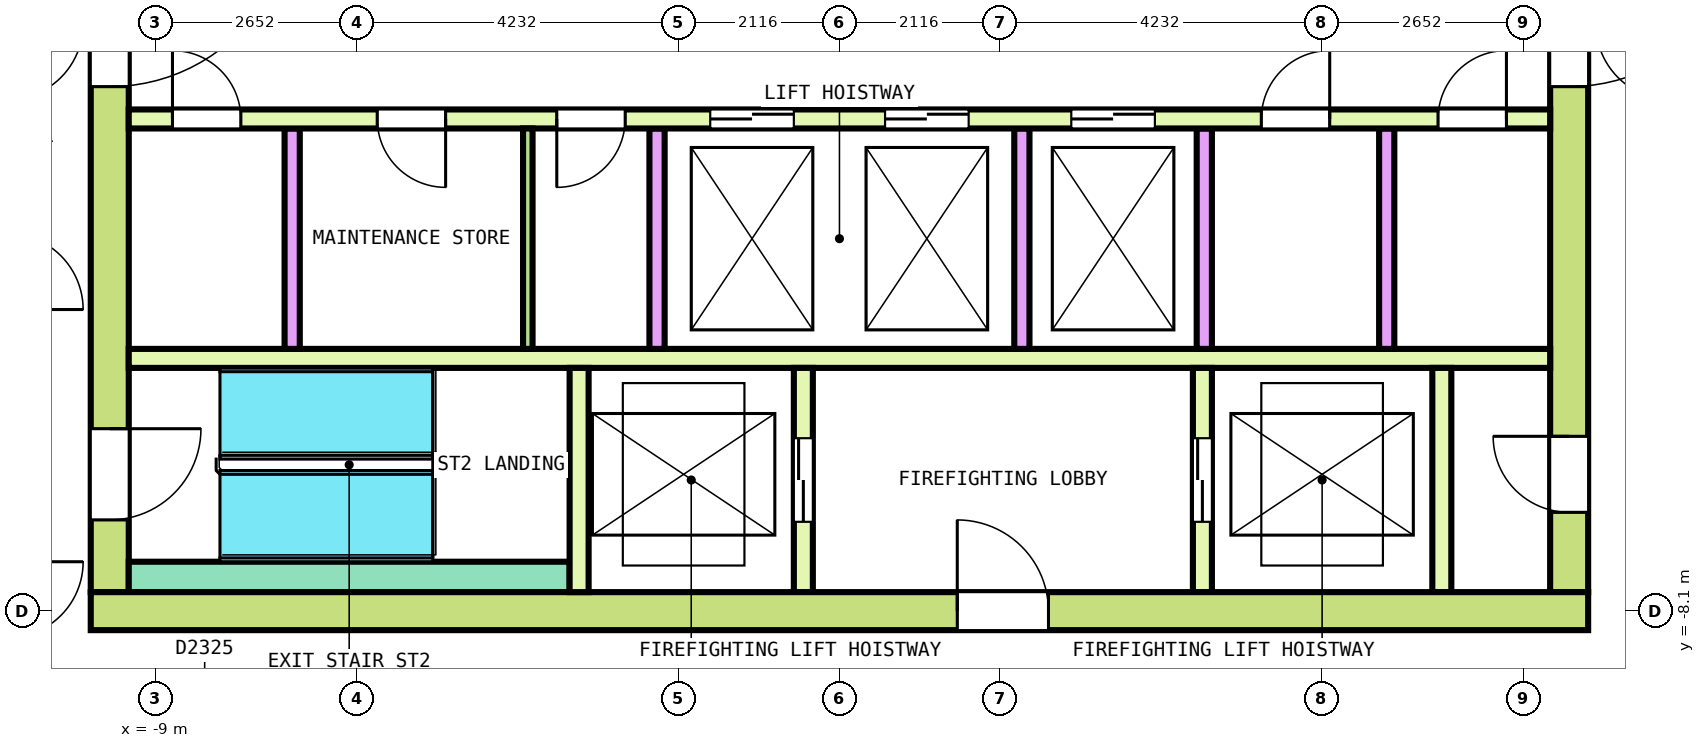
"""IFC4 building model, lengths in metres.
Left out: names, types, materials, properties, quantities, classifications, styles, units other than length and angle.
Written with IfcOpenShell. Run it as: python <this file> out.ifc"""

import sys

from ifc_helpers import new_model, si_unit, direction, frame, frame_2d, origin, place, context, subcontext, project, spatial, rectangle, extrude, element, fill, save


model = new_model("IFC4")
c1 = context("Model", 3, precision=1e-05, world=origin(), true_north=direction((0.0, 1.0)))
c2 = subcontext(c1, "Body", "Model", "MODEL_VIEW")
j1 = project(units=[si_unit("LENGTHUNIT", "METRE"), si_unit("PLANEANGLEUNIT", "RADIAN")], contexts=[c1])
p1 = place(None, origin())
s1 = spatial("IfcSite", under=j1, at=p1, CompositionType="ELEMENT")
p2 = place(p1, origin())
s2 = spatial("IfcBuilding", under=s1, at=p2, CompositionType="ELEMENT")
p3 = place(p2, frame((0.0, 0.0, 316.6)))
s3 = spatial("IfcBuildingStorey", under=s2, at=p3, CompositionType="ELEMENT", Elevation=316.6)
p4 = place(p3, frame((-9.85, -8.1, 0.0), z_axis=(0.0, 0.0, 1.0), x_axis=(1.0, 0.0, 0.0)))
e1 = element("IfcWall", 1, at=p4, inside=s3, PredefinedType="SHEAR", context=c2, shape_type="SweptSolid", body=[
    extrude(rectangle(XDim=19.7, YDim=0.5, at=frame_2d((9.85, 0.0))), origin(), (0.0, 0.0, 1.0), 3.7),
])
p5 = place(p4, frame((11.4, 0.0, 0.0)))
e2 = element("IfcOpeningElement", 2, at=p5, cuts=e1, PredefinedType="OPENING", context=c2, shape_type="SweptSolid", body=[
    extrude(rectangle(XDim=1.2, YDim=2.1, at=frame_2d((0.6, 1.05))), frame((0.0, 0.26, 0.0), z_axis=(0.0, -1.0, 0.0), x_axis=(1.0, 0.0, 0.0)), (0.0, 0.0, 1.0), 0.52),
])
p6 = place(p3, frame((-9.6, -7.85, 0.0), z_axis=(0.0, 0.0, 1.0), x_axis=(0.0, 1.0, 0.0)))
e3 = element("IfcWall", 3, at=p6, inside=s3, PredefinedType="SHEAR", context=c2, shape_type="SweptSolid", body=[
    extrude(rectangle(XDim=15.7, YDim=0.5, at=frame_2d((7.85, 0.0))), origin(), (0.0, 0.0, 1.0), 3.7),
])
p7 = place(p6, frame((6.65, 0.0, 0.0)))
e4 = element("IfcOpeningElement", 4, at=p7, cuts=e3, PredefinedType="OPENING", context=c2, shape_type="SweptSolid", body=[
    extrude(rectangle(XDim=2.4, YDim=2.1, at=frame_2d((1.2, 1.05))), frame((0.0, 0.26, 0.0), z_axis=(0.0, -1.0, 0.0), x_axis=(1.0, 0.0, 0.0)), (0.0, 0.0, 1.0), 0.52),
])
p8 = place(p6, frame((13.55, 0.0, 0.0)))
e5 = element("IfcOpeningElement", 5, at=p8, cuts=e3, PredefinedType="OPENING", context=c2, shape_type="SweptSolid", body=[
    extrude(rectangle(XDim=1.2, YDim=2.1, at=frame_2d((0.6, 1.05))), frame((0.0, 0.26, 0.0), z_axis=(0.0, -1.0, 0.0), x_axis=(1.0, 0.0, 0.0)), (0.0, 0.0, 1.0), 0.52),
])
p9 = place(p6, frame((0.95, 0.0, 0.0)))
e6 = element("IfcOpeningElement", 6, at=p9, cuts=e3, PredefinedType="OPENING", context=c2, shape_type="SweptSolid", body=[
    extrude(rectangle(XDim=1.2, YDim=2.1, at=frame_2d((0.6, 1.05))), frame((0.0, 0.26, 0.0), z_axis=(0.0, -1.0, 0.0), x_axis=(1.0, 0.0, 0.0)), (0.0, 0.0, 1.0), 0.52),
])
p10 = place(p3, frame((9.6, -7.85, 0.0), z_axis=(0.0, 0.0, 1.0), x_axis=(0.0, 1.0, 0.0)))
e7 = element("IfcWall", 7, at=p10, inside=s3, PredefinedType="SHEAR", context=c2, shape_type="SweptSolid", body=[
    extrude(rectangle(XDim=15.7, YDim=0.5, at=frame_2d((7.85, 0.0))), origin(), (0.0, 0.0, 1.0), 3.7),
])
p11 = place(p10, frame((6.65, 0.0, 0.0)))
e8 = element("IfcOpeningElement", 8, at=p11, cuts=e7, PredefinedType="OPENING", context=c2, shape_type="SweptSolid", body=[
    extrude(rectangle(XDim=2.4, YDim=2.1, at=frame_2d((1.2, 1.05))), frame((0.0, 0.26, 0.0), z_axis=(0.0, -1.0, 0.0), x_axis=(1.0, 0.0, 0.0)), (0.0, 0.0, 1.0), 0.52),
])
p12 = place(p10, frame((13.55, 0.0, 0.0)))
e9 = element("IfcOpeningElement", 9, at=p12, cuts=e7, PredefinedType="OPENING", context=c2, shape_type="SweptSolid", body=[
    extrude(rectangle(XDim=1.2, YDim=2.1, at=frame_2d((0.6, 1.05))), frame((0.0, 0.26, 0.0), z_axis=(0.0, -1.0, 0.0), x_axis=(1.0, 0.0, 0.0)), (0.0, 0.0, 1.0), 0.52),
])
p13 = place(p10, frame((1.05, 0.0, 0.0)))
e10 = element("IfcOpeningElement", 10, at=p13, cuts=e7, PredefinedType="OPENING", context=c2, shape_type="SweptSolid", body=[
    extrude(rectangle(XDim=1.0, YDim=2.1, at=frame_2d((0.5, 1.05))), frame((0.0, 0.26, 0.0), z_axis=(0.0, -1.0, 0.0), x_axis=(1.0, 0.0, 0.0)), (0.0, 0.0, 1.0), 0.52),
])
p14 = place(p3, frame((-9.35, -1.625, 0.0), z_axis=(0.0, 0.0, 1.0), x_axis=(1.0, 0.0, 0.0)))
e11 = element("IfcWall", 11, at=p14, inside=s3, PredefinedType="SOLIDWALL", context=c2, shape_type="SweptSolid", body=[
    extrude(rectangle(XDim=18.7, YDim=0.25, at=frame_2d((9.35, 0.0))), origin(), (0.0, 0.0, 1.0), 3.7),
])
p15 = place(p14, frame((7.65, 0.0, 0.0)))
e12 = element("IfcOpeningElement", 12, at=p15, cuts=e11, PredefinedType="OPENING", context=c2, shape_type="SweptSolid", body=[
    extrude(rectangle(XDim=1.1, YDim=2.1, at=frame_2d((0.55, 1.05))), frame((0.0, 0.135, 0.0), z_axis=(0.0, -1.0, 0.0), x_axis=(1.0, 0.0, 0.0)), (0.0, 0.0, 1.0), 0.27),
])
p16 = place(p14, frame((9.95, 0.0, 0.0)))
e13 = element("IfcOpeningElement", 13, at=p16, cuts=e11, PredefinedType="OPENING", context=c2, shape_type="SweptSolid", body=[
    extrude(rectangle(XDim=1.1, YDim=2.1, at=frame_2d((0.55, 1.05))), frame((0.0, 0.135, 0.0), z_axis=(0.0, -1.0, 0.0), x_axis=(1.0, 0.0, 0.0)), (0.0, 0.0, 1.0), 0.27),
])
p17 = place(p14, frame((12.4, 0.0, 0.0)))
e14 = element("IfcOpeningElement", 14, at=p17, cuts=e11, PredefinedType="OPENING", context=c2, shape_type="SweptSolid", body=[
    extrude(rectangle(XDim=1.1, YDim=2.1, at=frame_2d((0.55, 1.05))), frame((0.0, 0.135, 0.0), z_axis=(0.0, -1.0, 0.0), x_axis=(1.0, 0.0, 0.0)), (0.0, 0.0, 1.0), 0.27),
])
p18 = place(p14, frame((0.575, 0.0, 0.0)))
e15 = element("IfcOpeningElement", 15, at=p18, cuts=e11, PredefinedType="OPENING", context=c2, shape_type="SweptSolid", body=[
    extrude(rectangle(XDim=0.9, YDim=2.1, at=frame_2d((0.45, 1.05))), frame((0.0, 0.135, 0.0), z_axis=(0.0, -1.0, 0.0), x_axis=(1.0, 0.0, 0.0)), (0.0, 0.0, 1.0), 0.27),
])
p19 = place(p14, frame((3.269, 0.0, 0.0)))
e16 = element("IfcOpeningElement", 16, at=p19, cuts=e11, PredefinedType="OPENING", context=c2, shape_type="SweptSolid", body=[
    extrude(rectangle(XDim=0.9, YDim=2.1, at=frame_2d((0.45, 1.05))), frame((0.0, 0.135, 0.0), z_axis=(0.0, -1.0, 0.0), x_axis=(1.0, 0.0, 0.0)), (0.0, 0.0, 1.0), 0.27),
])
p20 = place(p14, frame((5.631, 0.0, 0.0)))
e17 = element("IfcOpeningElement", 17, at=p20, cuts=e11, PredefinedType="OPENING", context=c2, shape_type="SweptSolid", body=[
    extrude(rectangle(XDim=0.9, YDim=2.1, at=frame_2d((0.45, 1.05))), frame((0.0, 0.135, 0.0), z_axis=(0.0, -1.0, 0.0), x_axis=(1.0, 0.0, 0.0)), (0.0, 0.0, 1.0), 0.27),
])
p21 = place(p14, frame((14.9, 0.0, 0.0)))
e18 = element("IfcOpeningElement", 18, at=p21, cuts=e11, PredefinedType="OPENING", context=c2, shape_type="SweptSolid", body=[
    extrude(rectangle(XDim=0.9, YDim=2.1, at=frame_2d((0.45, 1.05))), frame((0.0, 0.135, 0.0), z_axis=(0.0, -1.0, 0.0), x_axis=(1.0, 0.0, 0.0)), (0.0, 0.0, 1.0), 0.27),
])
p22 = place(p14, frame((17.225, 0.0, 0.0)))
e19 = element("IfcOpeningElement", 19, at=p22, cuts=e11, PredefinedType="OPENING", context=c2, shape_type="SweptSolid", body=[
    extrude(rectangle(XDim=0.9, YDim=2.1, at=frame_2d((0.45, 1.05))), frame((0.0, 0.135, 0.0), z_axis=(0.0, -1.0, 0.0), x_axis=(1.0, 0.0, 0.0)), (0.0, 0.0, 1.0), 0.27),
])
p23 = place(p3, frame((-9.35, -4.775, 0.0), z_axis=(0.0, 0.0, 1.0), x_axis=(1.0, 0.0, 0.0)))
e20 = element("IfcWall", 20, at=p23, inside=s3, PredefinedType="SOLIDWALL", context=c2, shape_type="SweptSolid", body=[
    extrude(rectangle(XDim=18.7, YDim=0.25, at=frame_2d((9.35, 0.0))), origin(), (0.0, 0.0, 1.0), 3.7),
])
for number, where, z_axis, x_axis in (
    (21, (-7.2, -4.65, 0.0), (0.0, 0.0, 1.0), (0.0, 1.0, 0.0)),
    (22, (-2.4, -4.65, 0.0), (0.0, 0.0, 1.0), (0.0, 1.0, 0.0)),
    (23, (2.4, -4.65, 0.0), (0.0, 0.0, 1.0), (0.0, 1.0, 0.0)),
    (24, (4.8, -4.65, 0.0), (0.0, 0.0, 1.0), (0.0, 1.0, 0.0)),
    (25, (7.2, -4.65, 0.0), (0.0, 0.0, 1.0), (0.0, 1.0, 0.0)),
):
    element("IfcWall", number, at=place(p3, frame(where, z_axis=z_axis, x_axis=x_axis)), inside=s3, PredefinedType="SOLIDWALL", context=c2, shape_type="SweptSolid", body=[
        extrude(rectangle(XDim=2.9, YDim=0.2, at=frame_2d((1.45, 0.0))), origin(), (0.0, 0.0, 1.0), 3.7),
    ])
p24 = place(p3, frame((-9.35, -7.65, 0.0), z_axis=(0.0, 0.0, 1.0), x_axis=(1.0, 0.0, 0.0)))
e26 = element("IfcWall", 26, at=p24, inside=s3, PredefinedType="SOLIDWALL", context=c2, shape_type="SweptSolid", body=[
    extrude(rectangle(XDim=5.8, YDim=0.4, at=frame_2d((2.9, 0.0))), origin(), (0.0, 0.0, 1.0), 3.7),
])
p25 = place(p3, frame((-3.425, -7.85, 0.0), z_axis=(0.0, 0.0, 1.0), x_axis=(0.0, 1.0, 0.0)))
e27 = element("IfcWall", 27, at=p25, inside=s3, PredefinedType="SOLIDWALL", context=c2, shape_type="SweptSolid", body=[
    extrude(rectangle(XDim=2.95, YDim=0.25, at=frame_2d((1.475, 0.0))), origin(), (0.0, 0.0, 1.0), 3.7),
])
p26 = place(p3, frame((-0.475, -7.85, 0.0), z_axis=(0.0, 0.0, 1.0), x_axis=(0.0, 1.0, 0.0)))
e28 = element("IfcWall", 28, at=p26, inside=s3, PredefinedType="SOLIDWALL", context=c2, shape_type="SweptSolid", body=[
    extrude(rectangle(XDim=2.95, YDim=0.25, at=frame_2d((1.475, 0.0))), origin(), (0.0, 0.0, 1.0), 3.7),
])
p27 = place(p26, frame((0.925, 0.0, 0.0)))
e29 = element("IfcOpeningElement", 29, at=p27, cuts=e28, PredefinedType="OPENING", context=c2, shape_type="SweptSolid", body=[
    extrude(rectangle(XDim=1.1, YDim=2.1, at=frame_2d((0.55, 1.05))), frame((0.0, 0.135, 0.0), z_axis=(0.0, -1.0, 0.0), x_axis=(1.0, 0.0, 0.0)), (0.0, 0.0, 1.0), 0.27),
])
p28 = place(p3, frame((4.775, -7.85, 0.0), z_axis=(0.0, 0.0, 1.0), x_axis=(0.0, 1.0, 0.0)))
e30 = element("IfcWall", 30, at=p28, inside=s3, PredefinedType="SOLIDWALL", context=c2, shape_type="SweptSolid", body=[
    extrude(rectangle(XDim=2.95, YDim=0.25, at=frame_2d((1.475, 0.0))), origin(), (0.0, 0.0, 1.0), 3.7),
])
p29 = place(p28, frame((0.925, 0.0, 0.0)))
e31 = element("IfcOpeningElement", 31, at=p29, cuts=e30, PredefinedType="OPENING", context=c2, shape_type="SweptSolid", body=[
    extrude(rectangle(XDim=1.1, YDim=2.1, at=frame_2d((0.55, 1.05))), frame((0.0, 0.135, 0.0), z_axis=(0.0, -1.0, 0.0), x_axis=(1.0, 0.0, 0.0)), (0.0, 0.0, 1.0), 0.27),
])
p30 = place(p3, frame((7.925, -7.85, 0.0), z_axis=(0.0, 0.0, 1.0), x_axis=(0.0, 1.0, 0.0)))
e32 = element("IfcWall", 32, at=p30, inside=s3, PredefinedType="SOLIDWALL", context=c2, shape_type="SweptSolid", body=[
    extrude(rectangle(XDim=2.95, YDim=0.25, at=frame_2d((1.475, 0.0))), origin(), (0.0, 0.0, 1.0), 3.7),
])
p31 = place(p3, frame((-4.1, -4.65, 0.0), z_axis=(0.0, 0.0, 1.0), x_axis=(0.0, 1.0, 0.0)))
e33 = element("IfcWall", 33, at=p31, inside=s3, PredefinedType="PARTITIONING", context=c2, shape_type="SweptSolid", body=[
    extrude(rectangle(XDim=2.9, YDim=0.125, at=frame_2d((1.45, 0.0))), origin(), (0.0, 0.0, 1.0), 3.7),
])
p32 = place(p15, origin())
e34 = element("IfcDoor", 34, at=p32, inside=s3, OperationType="DOUBLE_DOOR_SLIDING", PredefinedType="DOOR", context=c2, shape_type="SweptSolid", body=[
    extrude(rectangle(XDim=1.1, YDim=2.1, at=frame_2d((0.55, 1.05))), frame((0.0, 0.075, 0.0), z_axis=(0.0, -1.0, 0.0), x_axis=(1.0, 0.0, 0.0)), (0.0, 0.0, 1.0), 0.15),
])
fill(e12, e34)
p33 = place(p16, origin())
e35 = element("IfcDoor", 35, at=p33, inside=s3, OperationType="DOUBLE_DOOR_SLIDING", PredefinedType="DOOR", context=c2, shape_type="SweptSolid", body=[
    extrude(rectangle(XDim=1.1, YDim=2.1, at=frame_2d((0.55, 1.05))), frame((0.0, 0.075, 0.0), z_axis=(0.0, -1.0, 0.0), x_axis=(1.0, 0.0, 0.0)), (0.0, 0.0, 1.0), 0.15),
])
fill(e13, e35)
p34 = place(p17, origin())
e36 = element("IfcDoor", 36, at=p34, inside=s3, OperationType="DOUBLE_DOOR_SLIDING", PredefinedType="DOOR", context=c2, shape_type="SweptSolid", body=[
    extrude(rectangle(XDim=1.1, YDim=2.1, at=frame_2d((0.55, 1.05))), frame((0.0, 0.075, 0.0), z_axis=(0.0, -1.0, 0.0), x_axis=(1.0, 0.0, 0.0)), (0.0, 0.0, 1.0), 0.15),
])
fill(e14, e36)
p35 = place(p27, origin())
e37 = element("IfcDoor", 37, at=p35, inside=s3, OperationType="DOUBLE_DOOR_SLIDING", PredefinedType="DOOR", context=c2, shape_type="SweptSolid", body=[
    extrude(rectangle(XDim=1.1, YDim=2.1, at=frame_2d((0.55, 1.05))), frame((0.0, 0.075, 0.0), z_axis=(0.0, -1.0, 0.0), x_axis=(1.0, 0.0, 0.0)), (0.0, 0.0, 1.0), 0.15),
])
fill(e29, e37)
p36 = place(p29, origin())
e38 = element("IfcDoor", 38, at=p36, inside=s3, OperationType="DOUBLE_DOOR_SLIDING", PredefinedType="DOOR", context=c2, shape_type="SweptSolid", body=[
    extrude(rectangle(XDim=1.1, YDim=2.1, at=frame_2d((0.55, 1.05))), frame((0.0, 0.075, 0.0), z_axis=(0.0, -1.0, 0.0), x_axis=(1.0, 0.0, 0.0)), (0.0, 0.0, 1.0), 0.15),
])
fill(e31, e38)
p37 = place(p7, origin())
e39 = element("IfcDoor", 39, at=p37, inside=s3, OperationType="DOUBLE_DOOR_SINGLE_SWING", PredefinedType="DOOR", context=c2, shape_type="SweptSolid", body=[
    extrude(rectangle(XDim=2.4, YDim=2.1, at=frame_2d((1.2, 1.05))), frame((0.0, 0.2, 0.0), z_axis=(0.0, -1.0, 0.0), x_axis=(1.0, 0.0, 0.0)), (0.0, 0.0, 1.0), 0.4),
])
fill(e4, e39)
p38 = place(p11, origin())
e40 = element("IfcDoor", 40, at=p38, inside=s3, OperationType="DOUBLE_DOOR_SINGLE_SWING", PredefinedType="DOOR", context=c2, shape_type="SweptSolid", body=[
    extrude(rectangle(XDim=2.4, YDim=2.1, at=frame_2d((1.2, 1.05))), frame((0.0, 0.2, 0.0), z_axis=(0.0, -1.0, 0.0), x_axis=(1.0, 0.0, 0.0)), (0.0, 0.0, 1.0), 0.4),
])
fill(e8, e40)
p39 = place(p9, origin())
e41 = element("IfcDoor", 41, at=p39, inside=s3, OperationType="SINGLE_SWING_RIGHT", PredefinedType="DOOR", context=c2, shape_type="SweptSolid", body=[
    extrude(rectangle(XDim=1.2, YDim=2.1, at=frame_2d((0.6, 1.05))), frame((0.0, 0.2, 0.0), z_axis=(0.0, -1.0, 0.0), x_axis=(1.0, 0.0, 0.0)), (0.0, 0.0, 1.0), 0.4),
])
fill(e6, e41)
p40 = place(p5, origin())
e42 = element("IfcDoor", 42, at=p40, inside=s3, OperationType="SINGLE_SWING_RIGHT", PredefinedType="DOOR", context=c2, shape_type="SweptSolid", body=[
    extrude(rectangle(XDim=1.2, YDim=2.1, at=frame_2d((0.6, 1.05))), frame((0.0, 0.2, 0.0), z_axis=(0.0, -1.0, 0.0), x_axis=(1.0, 0.0, 0.0)), (0.0, 0.0, 1.0), 0.4),
])
fill(e2, e42)
p41 = place(p13, origin())
e43 = element("IfcDoor", 43, at=p41, inside=s3, OperationType="SINGLE_SWING_RIGHT", PredefinedType="DOOR", context=c2, shape_type="SweptSolid", body=[
    extrude(rectangle(XDim=1.0, YDim=2.1, at=frame_2d((0.5, 1.05))), frame((0.0, 0.2, 0.0), z_axis=(0.0, -1.0, 0.0), x_axis=(1.0, 0.0, 0.0)), (0.0, 0.0, 1.0), 0.4),
])
fill(e10, e43)
p42 = place(p18, origin())
e44 = element("IfcDoor", 44, at=p42, inside=s3, OperationType="SINGLE_SWING_LEFT", PredefinedType="DOOR", context=c2, shape_type="SweptSolid", body=[
    extrude(rectangle(XDim=0.9, YDim=2.1, at=frame_2d((0.45, 1.05))), frame((0.0, 0.075, 0.0), z_axis=(0.0, -1.0, 0.0), x_axis=(1.0, 0.0, 0.0)), (0.0, 0.0, 1.0), 0.15),
])
fill(e15, e44)
p43 = place(p19, origin())
e45 = element("IfcDoor", 45, at=p43, inside=s3, OperationType="SINGLE_SWING_RIGHT", PredefinedType="DOOR", context=c2, shape_type="SweptSolid", body=[
    extrude(rectangle(XDim=0.9, YDim=2.1, at=frame_2d((0.45, 1.05))), frame((0.0, 0.075, 0.0), z_axis=(0.0, -1.0, 0.0), x_axis=(1.0, 0.0, 0.0)), (0.0, 0.0, 1.0), 0.15),
])
fill(e16, e45)
p44 = place(p20, origin())
e46 = element("IfcDoor", 46, at=p44, inside=s3, OperationType="SINGLE_SWING_LEFT", PredefinedType="DOOR", context=c2, shape_type="SweptSolid", body=[
    extrude(rectangle(XDim=0.9, YDim=2.1, at=frame_2d((0.45, 1.05))), frame((0.0, 0.075, 0.0), z_axis=(0.0, -1.0, 0.0), x_axis=(1.0, 0.0, 0.0)), (0.0, 0.0, 1.0), 0.15),
])
fill(e17, e46)
p45 = place(p21, origin())
e47 = element("IfcDoor", 47, at=p45, inside=s3, OperationType="SINGLE_SWING_RIGHT", PredefinedType="DOOR", context=c2, shape_type="SweptSolid", body=[
    extrude(rectangle(XDim=0.9, YDim=2.1, at=frame_2d((0.45, 1.05))), frame((0.0, 0.075, 0.0), z_axis=(0.0, -1.0, 0.0), x_axis=(1.0, 0.0, 0.0)), (0.0, 0.0, 1.0), 0.15),
])
fill(e18, e47)
p46 = place(p22, origin())
e48 = element("IfcDoor", 48, at=p46, inside=s3, OperationType="SINGLE_SWING_LEFT", PredefinedType="DOOR", context=c2, shape_type="SweptSolid", body=[
    extrude(rectangle(XDim=0.9, YDim=2.1, at=frame_2d((0.45, 1.05))), frame((0.0, 0.075, 0.0), z_axis=(0.0, -1.0, 0.0), x_axis=(1.0, 0.0, 0.0)), (0.0, 0.0, 1.0), 0.15),
])
fill(e19, e48)
save(model, sys.argv[1])
